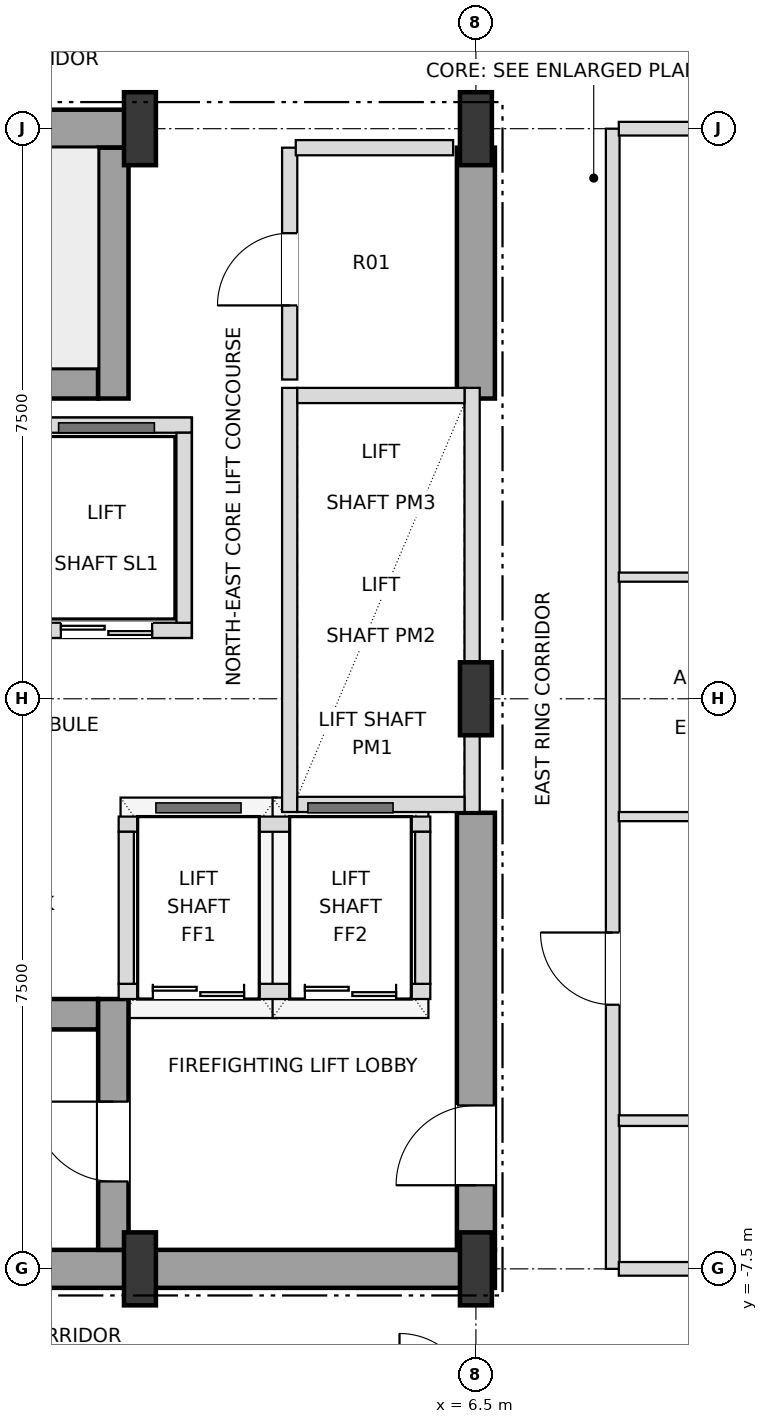
"""IFC4 building model, lengths in metres.
Left out: names, types, materials, properties, quantities, classifications, styles, units other than length and angle.
Written with IfcOpenShell. Run it as: python <this file> out.ifc"""

import sys

from ifc_helpers import new_model, si_unit, direction, frame, frame_2d, origin, origin_2d, place, context, subcontext, project, spatial, rectangle, i_section, extrude, element, fill, save


model = new_model("IFC4")
c1 = context("Model", 3, precision=1e-05, world=origin(), true_north=direction((0.0, 1.0)))
c2 = subcontext(c1, "Body", "Model", "MODEL_VIEW")
j1 = project(units=[si_unit("LENGTHUNIT", "METRE"), si_unit("PLANEANGLEUNIT", "RADIAN")], contexts=[c1])
p1 = place(None, origin())
s1 = spatial("IfcSite", under=j1, at=p1, CompositionType="ELEMENT")
p2 = place(p1, origin())
s2 = spatial("IfcBuilding", under=s1, at=p2, CompositionType="ELEMENT")
p3 = place(p2, frame((0.0, 0.0, 50.4)))
s3 = spatial("IfcBuildingStorey", under=s2, at=p3, CompositionType="ELEMENT", Elevation=50.4)
for number, where, z_axis, x_axis in (
    (1, (2.08, -7.5, 0.0), (0.0, 0.0, 1.0), (1.0, 0.0, 0.0)),
    (2, (6.5, -7.5, 0.0), (0.0, 0.0, 1.0), (1.0, 0.0, 0.0)),
    (3, (6.5, 0.0, 0.0), (0.0, 0.0, 1.0), (1.0, 0.0, 0.0)),
    (4, (2.08, 7.5, 0.0), (0.0, 0.0, 1.0), (1.0, 0.0, 0.0)),
    (5, (6.5, 7.5, 0.0), (0.0, 0.0, 1.0), (1.0, 0.0, 0.0)),
):
    element("IfcColumn", number, at=place(p3, frame(where, z_axis=z_axis, x_axis=x_axis)), inside=s3, PredefinedType="COLUMN", context=c2, shape_type="SweptSolid", body=[
        extrude(i_section(OverallWidth=0.42, OverallDepth=0.96, WebThickness=0.022, FlangeThickness=0.034, at=origin_2d()), origin(), (0.0, 0.0, 1.0), 3.6),
    ])
p4 = place(p3, frame((0.0, -7.5, 0.0), z_axis=(0.0, 0.0, 1.0), x_axis=(1.0, 0.0, 0.0)))
e6 = element("IfcWall", 6, at=p4, inside=s3, PredefinedType="SHEAR", context=c2, shape_type="SweptSolid", body=[
    extrude(rectangle(XDim=6.75, YDim=0.5, at=frame_2d((3.375, 0.0))), origin(), (0.0, 0.0, 1.0), 3.38),
])
p5 = place(p3, frame((0.0, 7.5, 0.0), z_axis=(0.0, 0.0, 1.0), x_axis=(1.0, 0.0, 0.0)))
e7 = element("IfcWall", 7, at=p5, inside=s3, PredefinedType="SHEAR", context=c2, shape_type="SweptSolid", body=[
    extrude(rectangle(XDim=2.08, YDim=0.5, at=frame_2d((1.04, 0.0))), origin(), (0.0, 0.0, 1.0), 3.38),
])
p6 = place(p3, frame((6.5, -7.25, 0.0), z_axis=(0.0, 0.0, 1.0), x_axis=(0.0, 1.0, 0.0)))
e8 = element("IfcWall", 8, at=p6, inside=s3, PredefinedType="SHEAR", context=c2, shape_type="SweptSolid", body=[
    extrude(rectangle(XDim=5.75, YDim=0.5, at=frame_2d((2.875, 0.0))), origin(), (0.0, 0.0, 1.0), 3.38),
])
p7 = place(p6, frame((0.85, 0.0, 0.0)))
e9 = element("IfcOpeningElement", 9, at=p7, cuts=e8, PredefinedType="OPENING", context=c2, shape_type="SweptSolid", body=[
    extrude(rectangle(XDim=1.05, YDim=2.15, at=frame_2d((0.525, 1.075))), frame((0.0, 0.26, 0.0), z_axis=(0.0, -1.0, 0.0), x_axis=(1.0, 0.0, 0.0)), (0.0, 0.0, 1.0), 0.52),
])
p8 = place(p3, frame((6.5, 3.95, 0.0), z_axis=(0.0, 0.0, 1.0), x_axis=(0.0, 1.0, 0.0)))
e10 = element("IfcWall", 10, at=p8, inside=s3, PredefinedType="SHEAR", context=c2, shape_type="SweptSolid", body=[
    extrude(rectangle(XDim=3.3, YDim=0.5, at=frame_2d((1.65, 0.0))), origin(), (0.0, 0.0, 1.0), 3.38),
])
p9 = place(p3, frame((-6.25, -4.15, 0.0), z_axis=(0.0, 0.0, 1.0), x_axis=(1.0, 0.0, 0.0)))
e11 = element("IfcWall", 11, at=p9, inside=s3, PredefinedType="SHEAR", context=c2, shape_type="SweptSolid", body=[
    extrude(rectangle(XDim=7.78, YDim=0.4, at=frame_2d((3.89, 0.0))), origin(), (0.0, 0.0, 1.0), 3.38),
])
p10 = place(p3, frame((1.73, -7.25, 0.0), z_axis=(0.0, 0.0, 1.0), x_axis=(0.0, 1.0, 0.0)))
e12 = element("IfcWall", 12, at=p10, inside=s3, PredefinedType="SHEAR", context=c2, shape_type="SweptSolid", body=[
    extrude(rectangle(XDim=3.3, YDim=0.4, at=frame_2d((1.65, 0.0))), origin(), (0.0, 0.0, 1.0), 3.38),
])
p11 = place(p10, frame((0.9, 0.0, 0.0)))
e13 = element("IfcOpeningElement", 13, at=p11, cuts=e12, PredefinedType="OPENING", context=c2, shape_type="SweptSolid", body=[
    extrude(rectangle(XDim=1.05, YDim=2.15, at=frame_2d((0.525, 1.075))), frame((0.0, 0.21, 0.0), z_axis=(0.0, -1.0, 0.0), x_axis=(1.0, 0.0, 0.0)), (0.0, 0.0, 1.0), 0.42),
])
p12 = place(p3, frame((-5.55, 4.15, 0.0), z_axis=(0.0, 0.0, 1.0), x_axis=(1.0, 0.0, 0.0)))
e14 = element("IfcWall", 14, at=p12, inside=s3, PredefinedType="SHEAR", context=c2, shape_type="SweptSolid", body=[
    extrude(rectangle(XDim=7.08, YDim=0.4, at=frame_2d((3.54, 0.0))), origin(), (0.0, 0.0, 1.0), 3.38),
])
p13 = place(p3, frame((1.73, 3.95, 0.0), z_axis=(0.0, 0.0, 1.0), x_axis=(0.0, 1.0, 0.0)))
e15 = element("IfcWall", 15, at=p13, inside=s3, PredefinedType="SHEAR", context=c2, shape_type="SweptSolid", body=[
    extrude(rectangle(XDim=3.3, YDim=0.4, at=frame_2d((1.65, 0.0))), origin(), (0.0, 0.0, 1.0), 3.38),
])
p14 = place(p3, frame((4.05, -1.49, 0.0), z_axis=(0.0, 0.0, 1.0), x_axis=(0.0, 1.0, 0.0)))
e16 = element("IfcWall", 16, at=p14, inside=s3, PredefinedType="SOLIDWALL", context=c2, shape_type="SweptSolid", body=[
    extrude(rectangle(XDim=5.58, YDim=0.2, at=frame_2d((2.79, 0.0))), origin(), (0.0, 0.0, 1.0), 3.38),
])
p15 = place(p3, frame((6.45, -1.49, 0.0), z_axis=(0.0, 0.0, 1.0), x_axis=(0.0, 1.0, 0.0)))
e17 = element("IfcWall", 17, at=p15, inside=s3, PredefinedType="SOLIDWALL", context=c2, shape_type="SweptSolid", body=[
    extrude(rectangle(XDim=5.58, YDim=0.2, at=frame_2d((2.79, 0.0))), origin(), (0.0, 0.0, 1.0), 2.816),
])
for number, where, z_axis, x_axis in (
    (18, (4.15, -1.39, 0.0), (0.0, 0.0, 1.0), (1.0, 0.0, 0.0)),
    (19, (4.15, 3.99, 0.0), (0.0, 0.0, 1.0), (1.0, 0.0, 0.0)),
):
    element("IfcWall", number, at=place(p3, frame(where, z_axis=z_axis, x_axis=x_axis)), inside=s3, PredefinedType="SOLIDWALL", context=c2, shape_type="SweptSolid", body=[
        extrude(rectangle(XDim=2.2, YDim=0.2, at=frame_2d((1.1, 0.0))), origin(), (0.0, 0.0, 1.0), 3.38),
    ])
p16 = place(p3, frame((-2.82, 0.9, 0.0), z_axis=(0.0, 0.0, 1.0), x_axis=(1.0, 0.0, 0.0)))
e20 = element("IfcWall", 20, at=p16, inside=s3, PredefinedType="SOLIDWALL", context=c2, shape_type="SweptSolid", body=[
    extrude(rectangle(XDim=5.58, YDim=0.2, at=frame_2d((2.79, 0.0))), origin(), (0.0, 0.0, 1.0), 3.38),
])
p17 = place(p16, frame((3.86, 0.0, 0.0)))
e21 = element("IfcOpeningElement", 21, at=p17, cuts=e20, PredefinedType="OPENING", context=c2, shape_type="SweptSolid", body=[
    extrude(rectangle(XDim=1.2, YDim=2.2, at=frame_2d((0.6, 1.1))), frame((0.0, 0.11, 0.0), z_axis=(0.0, -1.0, 0.0), x_axis=(1.0, 0.0, 0.0)), (0.0, 0.0, 1.0), 0.22),
])
p18 = place(p3, frame((-2.82, 3.6, 0.0), z_axis=(0.0, 0.0, 1.0), x_axis=(1.0, 0.0, 0.0)))
e22 = element("IfcWall", 22, at=p18, inside=s3, PredefinedType="SOLIDWALL", context=c2, shape_type="SweptSolid", body=[
    extrude(rectangle(XDim=5.58, YDim=0.2, at=frame_2d((2.79, 0.0))), origin(), (0.0, 0.0, 1.0), 3.38),
])
p19 = place(p3, frame((2.66, 1.0, 0.0), z_axis=(0.0, 0.0, 1.0), x_axis=(0.0, 1.0, 0.0)))
e23 = element("IfcWall", 23, at=p19, inside=s3, PredefinedType="SOLIDWALL", context=c2, shape_type="SweptSolid", body=[
    extrude(rectangle(XDim=2.5, YDim=0.2, at=frame_2d((1.25, 0.0))), origin(), (0.0, 0.0, 1.0), 3.38),
])
p20 = place(p3, frame((1.8, -3.85, 0.0), z_axis=(0.0, 0.0, 1.0), x_axis=(1.0, 0.0, 0.0)))
e24 = element("IfcWall", 24, at=p20, inside=s3, PredefinedType="SOLIDWALL", context=c2, shape_type="SweptSolid", body=[
    extrude(rectangle(XDim=4.1, YDim=0.2, at=frame_2d((2.05, 0.0))), origin(), (0.0, 0.0, 1.0), 3.38),
])
p21 = place(p20, frame((0.45, 0.0, 0.0)))
e25 = element("IfcOpeningElement", 25, at=p21, cuts=e24, PredefinedType="OPENING", context=c2, shape_type="SweptSolid", body=[
    extrude(rectangle(XDim=1.2, YDim=2.2, at=frame_2d((0.6, 1.1))), frame((0.0, 0.11, 0.0), z_axis=(0.0, -1.0, 0.0), x_axis=(1.0, 0.0, 0.0)), (0.0, 0.0, 1.0), 0.22),
])
p22 = place(p20, frame((2.45, 0.0, 0.0)))
e26 = element("IfcOpeningElement", 26, at=p22, cuts=e24, PredefinedType="OPENING", context=c2, shape_type="SweptSolid", body=[
    extrude(rectangle(XDim=1.2, YDim=2.2, at=frame_2d((0.6, 1.1))), frame((0.0, 0.11, 0.0), z_axis=(0.0, -1.0, 0.0), x_axis=(1.0, 0.0, 0.0)), (0.0, 0.0, 1.0), 0.22),
])
p23 = place(p3, frame((1.8, -1.65, 0.0), z_axis=(0.0, 0.0, 1.0), x_axis=(1.0, 0.0, 0.0)))
e27 = element("IfcWall", 27, at=p23, inside=s3, PredefinedType="SOLIDWALL", context=c2, shape_type="SweptSolid", body=[
    extrude(rectangle(XDim=4.1, YDim=0.2, at=frame_2d((2.05, 0.0))), origin(), (0.0, 0.0, 1.0), 3.38),
])
for number, where, z_axis, x_axis in (
    (28, (1.9, -3.75, 0.0), (0.0, 0.0, 1.0), (0.0, 1.0, 0.0)),
    (29, (5.8, -3.75, 0.0), (0.0, 0.0, 1.0), (0.0, 1.0, 0.0)),
):
    element("IfcWall", number, at=place(p3, frame(where, z_axis=z_axis, x_axis=x_axis)), inside=s3, PredefinedType="SOLIDWALL", context=c2, shape_type="SweptSolid", body=[
        extrude(rectangle(XDim=2.0, YDim=0.2, at=frame_2d((1.0, 0.0))), origin(), (0.0, 0.0, 1.0), 3.38),
    ])
p24 = place(p3, frame((4.05, 4.2, 0.0), z_axis=(0.0, 0.0, 1.0), x_axis=(0.0, 1.0, 0.0)))
e30 = element("IfcWall", 30, at=p24, inside=s3, PredefinedType="SOLIDWALL", context=c2, shape_type="SweptSolid", body=[
    extrude(rectangle(XDim=3.05, YDim=0.2, at=frame_2d((1.525, 0.0))), origin(), (0.0, 0.0, 1.0), 3.38),
])
p25 = place(p24, frame((0.975, 0.0, 0.0)))
e31 = element("IfcOpeningElement", 31, at=p25, cuts=e30, PredefinedType="OPENING", context=c2, shape_type="SweptSolid", body=[
    extrude(rectangle(XDim=0.95, YDim=2.15, at=frame_2d((0.475, 1.075))), frame((0.0, 0.11, 0.0), z_axis=(0.0, -1.0, 0.0), x_axis=(1.0, 0.0, 0.0)), (0.0, 0.0, 1.0), 0.22),
])
p26 = place(p3, frame((8.3, -7.5, 0.0), z_axis=(0.0, 0.0, 1.0), x_axis=(0.0, 1.0, 0.0)))
e32 = element("IfcWall", 32, at=p26, inside=s3, PredefinedType="PARTITIONING", context=c2, shape_type="SweptSolid", body=[
    extrude(rectangle(XDim=15.0, YDim=0.18, at=frame_2d((7.5, 0.0))), origin(), (0.0, 0.0, 1.0), 3.38),
])
p27 = place(p26, frame((3.475, 0.0, 0.0)))
e33 = element("IfcOpeningElement", 33, at=p27, cuts=e32, PredefinedType="OPENING", context=c2, shape_type="SweptSolid", body=[
    extrude(rectangle(XDim=0.95, YDim=2.15, at=frame_2d((0.475, 1.075))), frame((0.0, 0.1, 0.0), z_axis=(0.0, -1.0, 0.0), x_axis=(1.0, 0.0, 0.0)), (0.0, 0.0, 1.0), 0.2),
])
p28 = place(p3, frame((8.38, -7.5, 0.0), z_axis=(0.0, 0.0, 1.0), x_axis=(1.0, 0.0, 0.0)))
e34 = element("IfcWall", 34, at=p28, inside=s3, PredefinedType="PARTITIONING", context=c2, shape_type="SweptSolid", body=[
    extrude(rectangle(XDim=7.64, YDim=0.18, at=frame_2d((3.82, 0.0))), origin(), (0.0, 0.0, 1.0), 2.816),
])
p29 = place(p3, frame((8.38, -5.55, 0.0), z_axis=(0.0, 0.0, 1.0), x_axis=(1.0, 0.0, 0.0)))
e35 = element("IfcWall", 35, at=p29, inside=s3, PredefinedType="PARTITIONING", context=c2, shape_type="SweptSolid", body=[
    extrude(rectangle(XDim=7.64, YDim=0.14, at=frame_2d((3.82, 0.0))), origin(), (0.0, 0.0, 1.0), 2.948),
])
p30 = place(p29, frame((3.37, 0.0, 0.0)))
e36 = element("IfcOpeningElement", 36, at=p30, cuts=e35, PredefinedType="OPENING", context=c2, shape_type="SweptSolid", body=[
    extrude(rectangle(XDim=0.9, YDim=2.1, at=frame_2d((0.45, 1.05))), frame((0.0, 0.08, 0.0), z_axis=(0.0, -1.0, 0.0), x_axis=(1.0, 0.0, 0.0)), (0.0, 0.0, 1.0), 0.16),
])
p31 = place(p3, frame((8.38, -1.55, 0.0), z_axis=(0.0, 0.0, 1.0), x_axis=(1.0, 0.0, 0.0)))
e37 = element("IfcWall", 37, at=p31, inside=s3, PredefinedType="PARTITIONING", context=c2, shape_type="SweptSolid", body=[
    extrude(rectangle(XDim=7.64, YDim=0.12, at=frame_2d((3.82, 0.0))), origin(), (0.0, 0.0, 1.0), 2.948),
])
p32 = place(p31, frame((3.345, 0.0, 0.0)))
e38 = element("IfcOpeningElement", 38, at=p32, cuts=e37, PredefinedType="OPENING", context=c2, shape_type="SweptSolid", body=[
    extrude(rectangle(XDim=0.95, YDim=2.1, at=frame_2d((0.475, 1.05))), frame((0.0, 0.07, 0.0), z_axis=(0.0, -1.0, 0.0), x_axis=(1.0, 0.0, 0.0)), (0.0, 0.0, 1.0), 0.14),
])
p33 = place(p3, frame((8.38, 1.6, 0.0), z_axis=(0.0, 0.0, 1.0), x_axis=(1.0, 0.0, 0.0)))
e39 = element("IfcWall", 39, at=p33, inside=s3, PredefinedType="PARTITIONING", context=c2, shape_type="SweptSolid", body=[
    extrude(rectangle(XDim=7.64, YDim=0.12, at=frame_2d((3.82, 0.0))), origin(), (0.0, 0.0, 1.0), 2.948),
])
p34 = place(p33, frame((3.37, 0.0, 0.0)))
e40 = element("IfcOpeningElement", 40, at=p34, cuts=e39, PredefinedType="OPENING", context=c2, shape_type="SweptSolid", body=[
    extrude(rectangle(XDim=0.9, YDim=2.1, at=frame_2d((0.45, 1.05))), frame((0.0, 0.07, 0.0), z_axis=(0.0, -1.0, 0.0), x_axis=(1.0, 0.0, 0.0)), (0.0, 0.0, 1.0), 0.14),
])
p35 = place(p3, frame((4.13, 7.25, 0.0), z_axis=(0.0, 0.0, 1.0), x_axis=(1.0, 0.0, 0.0)))
e41 = element("IfcWall", 41, at=p35, inside=s3, PredefinedType="SOLIDWALL", context=c2, shape_type="SweptSolid", body=[
    extrude(rectangle(XDim=2.07, YDim=0.2, at=frame_2d((1.035, 0.0))), origin(), (0.0, 0.0, 1.0), 3.38),
])
p36 = place(p3, frame((8.38, 7.5, 0.0), z_axis=(0.0, 0.0, 1.0), x_axis=(1.0, 0.0, 0.0)))
e42 = element("IfcWall", 42, at=p36, inside=s3, PredefinedType="PARTITIONING", context=c2, shape_type="SweptSolid", body=[
    extrude(rectangle(XDim=7.64, YDim=0.18, at=frame_2d((3.82, 0.0))), origin(), (0.0, 0.0, 1.0), 2.816),
])
p37 = place(p7, origin())
e43 = element("IfcDoor", 43, at=p37, inside=s3, OperationType="SINGLE_SWING_LEFT", PredefinedType="DOOR", context=c2, shape_type="SweptSolid", body=[
    extrude(rectangle(XDim=1.05, YDim=2.15, at=frame_2d((0.525, 1.075))), frame((0.0, 0.025, 0.0), z_axis=(0.0, -1.0, 0.0), x_axis=(1.0, 0.0, 0.0)), (0.0, 0.0, 1.0), 0.05),
])
fill(e9, e43)
p38 = place(p11, origin())
e44 = element("IfcDoor", 44, at=p38, inside=s3, OperationType="SINGLE_SWING_RIGHT", PredefinedType="DOOR", context=c2, shape_type="SweptSolid", body=[
    extrude(rectangle(XDim=1.05, YDim=2.15, at=frame_2d((0.525, 1.075))), frame((0.0, 0.025, 0.0), z_axis=(0.0, -1.0, 0.0), x_axis=(1.0, 0.0, 0.0)), (0.0, 0.0, 1.0), 0.05),
])
fill(e13, e44)
p39 = place(p17, origin())
e45 = element("IfcDoor", 45, at=p39, inside=s3, OperationType="DOUBLE_DOOR_SLIDING", PredefinedType="DOOR", context=c2, shape_type="SweptSolid", body=[
    extrude(rectangle(XDim=1.2, YDim=2.2, at=frame_2d((0.6, 1.1))), frame((0.0, 0.025, 0.0), z_axis=(0.0, -1.0, 0.0), x_axis=(1.0, 0.0, 0.0)), (0.0, 0.0, 1.0), 0.05),
])
fill(e21, e45)
p40 = place(p21, origin())
e46 = element("IfcDoor", 46, at=p40, inside=s3, OperationType="DOUBLE_DOOR_SLIDING", PredefinedType="DOOR", context=c2, shape_type="SweptSolid", body=[
    extrude(rectangle(XDim=1.2, YDim=2.2, at=frame_2d((0.6, 1.1))), frame((0.0, 0.025, 0.0), z_axis=(0.0, -1.0, 0.0), x_axis=(1.0, 0.0, 0.0)), (0.0, 0.0, 1.0), 0.05),
])
fill(e25, e46)
p41 = place(p22, origin())
e47 = element("IfcDoor", 47, at=p41, inside=s3, OperationType="DOUBLE_DOOR_SLIDING", PredefinedType="DOOR", context=c2, shape_type="SweptSolid", body=[
    extrude(rectangle(XDim=1.2, YDim=2.2, at=frame_2d((0.6, 1.1))), frame((0.0, 0.025, 0.0), z_axis=(0.0, -1.0, 0.0), x_axis=(1.0, 0.0, 0.0)), (0.0, 0.0, 1.0), 0.05),
])
fill(e26, e47)
p42 = place(p25, origin())
e48 = element("IfcDoor", 48, at=p42, inside=s3, OperationType="SINGLE_SWING_LEFT", PredefinedType="DOOR", context=c2, shape_type="SweptSolid", body=[
    extrude(rectangle(XDim=0.95, YDim=2.15, at=frame_2d((0.475, 1.075))), frame((0.0, 0.025, 0.0), z_axis=(0.0, -1.0, 0.0), x_axis=(1.0, 0.0, 0.0)), (0.0, 0.0, 1.0), 0.05),
])
fill(e31, e48)
p43 = place(p27, origin())
e49 = element("IfcDoor", 49, at=p43, inside=s3, OperationType="SINGLE_SWING_RIGHT", PredefinedType="DOOR", context=c2, shape_type="SweptSolid", body=[
    extrude(rectangle(XDim=0.95, YDim=2.15, at=frame_2d((0.475, 1.075))), frame((0.0, 0.025, 0.0), z_axis=(0.0, -1.0, 0.0), x_axis=(1.0, 0.0, 0.0)), (0.0, 0.0, 1.0), 0.05),
])
fill(e33, e49)
save(model, sys.argv[1])
